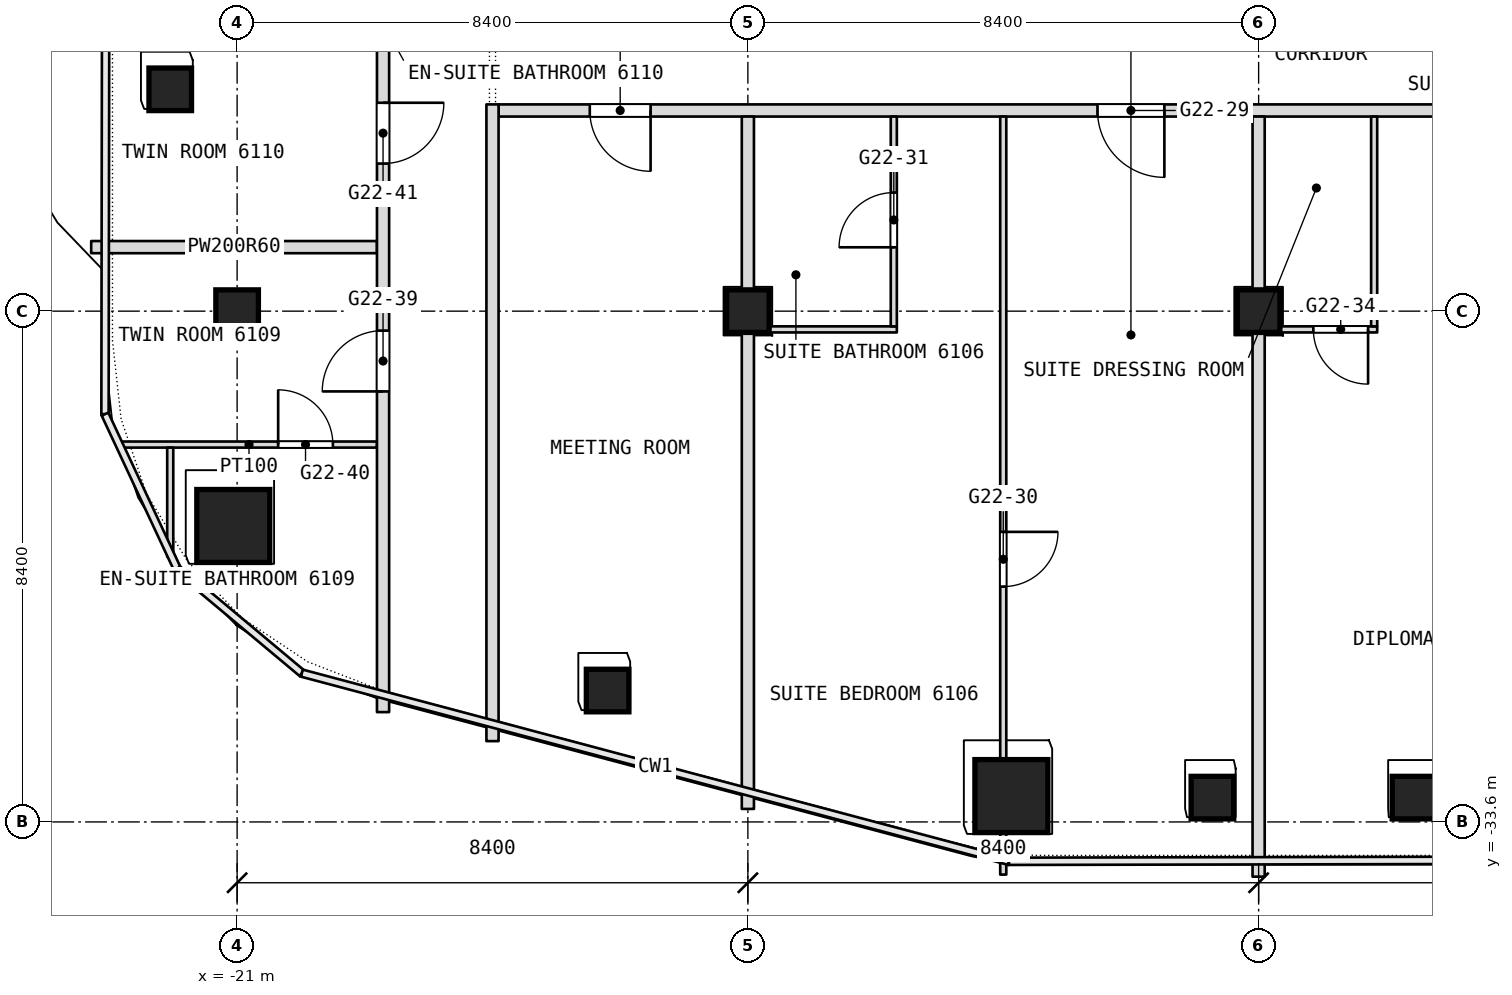
"""IFC4 building model, lengths in metres.
Left out: names, types, materials, properties, quantities, classifications, styles, units other than length and angle.
Written with IfcOpenShell. Run it as: python <this file> out.ifc"""

import sys

from ifc_helpers import new_model, si_unit, direction, frame, frame_2d, origin, origin_2d, place, context, subcontext, project, spatial, rectangle, extrude, element, fill, save


model = new_model("IFC4")
c1 = context("Model", 3, precision=1e-05, world=origin(), true_north=direction((0.0, 1.0)))
c2 = subcontext(c1, "Body", "Model", "MODEL_VIEW")
j1 = project(units=[si_unit("LENGTHUNIT", "METRE"), si_unit("PLANEANGLEUNIT", "RADIAN")], contexts=[c1])
p1 = place(None, origin())
s1 = spatial("IfcSite", under=j1, at=p1, CompositionType="ELEMENT")
p2 = place(p1, origin())
s2 = spatial("IfcBuilding", under=s1, at=p2, CompositionType="ELEMENT")
p3 = place(p2, frame((0.0, 0.0, 266.9)))
s3 = spatial("IfcBuildingStorey", under=s2, at=p3, CompositionType="ELEMENT", Elevation=266.9)
for number, where, z_axis, x_axis in (
    (1, (-21.063, -28.733, 0.0), (0.0, 0.0, 1.0), (1.0, 0.0, 0.0)),
    (2, (-8.266, -33.175, 0.0), (0.0, 0.0, 1.0), (1.0, 0.0, 0.0)),
):
    element("IfcColumn", number, at=place(p3, frame(where, z_axis=z_axis, x_axis=x_axis)), inside=s3, PredefinedType="COLUMN", context=c2, shape_type="SweptSolid", body=[
        extrude(rectangle(XDim=1.2, YDim=1.2, at=origin_2d()), origin(), (0.0, 0.0, 1.0), 3.6),
    ])
p4 = place(p3, frame((-21.0, -25.2, -0.26), z_axis=(0.0, 0.0, 1.0), x_axis=(1.0, 0.0, 0.0)))
e3 = element("IfcColumn", 3, at=p4, inside=s3, PredefinedType="COLUMN", context=c2, shape_type="SweptSolid", body=[
    extrude(rectangle(XDim=0.7, YDim=0.7, at=origin_2d()), origin(), (0.0, 0.0, 1.0), 3.86),
])
for number, where, z_axis, x_axis in (
    (4, (-12.6, -25.2, 0.0), (0.0, 0.0, 1.0), (1.0, 0.0, 0.0)),
    (5, (-4.2, -25.2, 0.0), (0.0, 0.0, 1.0), (1.0, 0.0, 0.0)),
    (6, (-22.1, -21.552, 0.0), (0.0, 0.0, 1.0), (1.0, 0.0, 0.0)),
    (7, (-1.653, -33.2, 0.0), (0.0, 0.0, 1.0), (1.0, 0.0, 0.0)),
    (8, (-4.96, -33.2, 0.0), (0.0, 0.0, 1.0), (1.0, 0.0, 0.0)),
    (9, (-14.907, -31.439, 0.0), (0.0, 0.0, 1.0), (1.0, 0.0, 0.0)),
):
    element("IfcColumn", number, at=place(p3, frame(where, z_axis=z_axis, x_axis=x_axis)), inside=s3, PredefinedType="COLUMN", context=c2, shape_type="SweptSolid", body=[
        extrude(rectangle(XDim=0.7, YDim=0.7, at=origin_2d()), origin(), (0.0, 0.0, 1.0), 3.6),
    ])
p5 = place(p3, frame((-22.909, -27.394, 0.0), z_axis=(0.0, 0.0, 1.0), x_axis=(1.0, 0.0, 0.0)))
e10 = element("IfcWall", 10, at=p5, inside=s3, PredefinedType="PARTITIONING", context=c2, shape_type="SweptSolid", body=[
    extrude(rectangle(XDim=4.209, YDim=0.1, at=frame_2d((2.104, 0.0))), origin(), (0.0, 0.0, 1.0), 3.34),
])
p6 = place(p5, frame((2.584, 0.0, 0.0)))
e11 = element("IfcOpeningElement", 11, at=p6, cuts=e10, PredefinedType="OPENING", context=c2, shape_type="SweptSolid", body=[
    extrude(rectangle(XDim=0.9, YDim=2.1, at=frame_2d((0.45, 1.05))), frame((0.0, 0.05, 0.0), z_axis=(0.0, -1.0, 0.0), x_axis=(1.0, 0.0, 0.0)), (0.0, 0.0, 1.0), 0.1),
])
p7 = place(p3, frame((-12.5, -25.5, 0.0), z_axis=(0.0, 0.0, 1.0), x_axis=(1.0, 0.0, 0.0)))
e12 = element("IfcWall", 12, at=p7, inside=s3, PredefinedType="PARTITIONING", context=c2, shape_type="SweptSolid", body=[
    extrude(rectangle(XDim=2.35, YDim=0.1, at=frame_2d((1.175, 0.0))), origin(), (0.0, 0.0, 1.0), 3.34),
])
p8 = place(p3, frame((-4.1, -25.5, 0.0), z_axis=(0.0, 0.0, 1.0), x_axis=(1.0, 0.0, 0.0)))
e13 = element("IfcWall", 13, at=p8, inside=s3, PredefinedType="PARTITIONING", context=c2, shape_type="SweptSolid", body=[
    extrude(rectangle(XDim=1.85, YDim=0.1, at=frame_2d((0.925, 0.0))), origin(), (0.0, 0.0, 1.0), 3.34),
])
p9 = place(p8, frame((0.8, 0.0, 0.0)))
e14 = element("IfcOpeningElement", 14, at=p9, cuts=e13, PredefinedType="OPENING", context=c2, shape_type="SweptSolid", body=[
    extrude(rectangle(XDim=0.9, YDim=2.1, at=frame_2d((0.45, 1.05))), frame((0.0, 0.05, 0.0), z_axis=(0.0, -1.0, 0.0), x_axis=(1.0, 0.0, 0.0)), (0.0, 0.0, 1.0), 0.1),
])
p10 = place(p3, frame((-23.4, -24.147, 0.0), z_axis=(0.0, 0.0, 1.0), x_axis=(1.0, 0.0, 0.0)))
e15 = element("IfcWall", 15, at=p10, inside=s3, PredefinedType="PARTITIONING", context=c2, shape_type="SweptSolid", body=[
    extrude(rectangle(XDim=4.7, YDim=0.2, at=frame_2d((2.35, 0.0))), origin(), (0.0, 0.0, 1.0), 3.34),
])
p11 = place(p3, frame((-16.7, -21.9, 0.0), z_axis=(0.0, 0.0, 1.0), x_axis=(1.0, 0.0, 0.0)))
e16 = element("IfcWall", 16, at=p11, inside=s3, PredefinedType="PARTITIONING", context=c2, shape_type="SweptSolid", body=[
    extrude(rectangle(XDim=21.0, YDim=0.2, at=frame_2d((10.5, 0.0))), origin(), (0.0, 0.0, 1.0), 3.34),
])
p12 = place(p11, frame((1.5, 0.0, 0.0)))
e17 = element("IfcOpeningElement", 17, at=p12, cuts=e16, PredefinedType="OPENING", context=c2, shape_type="SweptSolid", body=[
    extrude(rectangle(XDim=1.0, YDim=2.1, at=frame_2d((0.5, 1.05))), frame((0.0, 0.1, 0.0), z_axis=(0.0, -1.0, 0.0), x_axis=(1.0, 0.0, 0.0)), (0.0, 0.0, 1.0), 0.2),
])
p13 = place(p11, frame((9.85, 0.0, 0.0)))
e18 = element("IfcOpeningElement", 18, at=p13, cuts=e16, PredefinedType="OPENING", context=c2, shape_type="SweptSolid", body=[
    extrude(rectangle(XDim=1.1, YDim=2.1, at=frame_2d((0.55, 1.05))), frame((0.0, 0.1, 0.0), z_axis=(0.0, -1.0, 0.0), x_axis=(1.0, 0.0, 0.0)), (0.0, 0.0, 1.0), 0.2),
])
p14 = place(p11, frame((16.1, 0.0, 0.0)))
e19 = element("IfcOpeningElement", 19, at=p14, cuts=e16, PredefinedType="OPENING", context=c2, shape_type="SweptSolid", body=[
    extrude(rectangle(XDim=1.1, YDim=2.1, at=frame_2d((0.55, 1.05))), frame((0.0, 0.1, 0.0), z_axis=(0.0, -1.0, 0.0), x_axis=(1.0, 0.0, 0.0)), (0.0, 0.0, 1.0), 0.2),
])
p15 = place(p3, frame((-2.3, -25.45, 0.0), z_axis=(0.0, 0.0, 1.0), x_axis=(0.0, 1.0, 0.0)))
e20 = element("IfcWall", 20, at=p15, inside=s3, PredefinedType="PARTITIONING", context=c2, shape_type="SweptSolid", body=[
    extrude(rectangle(XDim=3.45, YDim=0.1, at=frame_2d((1.725, 0.0))), origin(), (0.0, 0.0, 1.0), 3.34),
])
p16 = place(p3, frame((-4.2, -34.5, 0.0), z_axis=(0.0, 0.0, 1.0), x_axis=(0.0, 1.0, 0.0)))
e21 = element("IfcWall", 21, at=p16, inside=s3, PredefinedType="PARTITIONING", context=c2, shape_type="SweptSolid", body=[
    extrude(rectangle(XDim=12.5, YDim=0.2, at=frame_2d((6.25, 0.0))), origin(), (0.0, 0.0, 1.0), 3.34),
])
p17 = place(p3, frame((-8.4, -34.466, 0.0), z_axis=(0.0, 0.0, 1.0), x_axis=(0.0, 1.0, 0.0)))
e22 = element("IfcWall", 22, at=p17, inside=s3, PredefinedType="PARTITIONING", context=c2, shape_type="SweptSolid", body=[
    extrude(rectangle(XDim=0.691, YDim=0.1, at=frame_2d((0.346, 0.0))), origin(), (0.0, 0.0, 1.0), 3.34),
])
p18 = place(p3, frame((-8.4, -32.575, 0.0), z_axis=(0.0, 0.0, 1.0), x_axis=(0.0, 1.0, 0.0)))
e23 = element("IfcWall", 23, at=p18, inside=s3, PredefinedType="PARTITIONING", context=c2, shape_type="SweptSolid", body=[
    extrude(rectangle(XDim=10.575, YDim=0.1, at=frame_2d((5.288, 0.0))), origin(), (0.0, 0.0, 1.0), 3.34),
])
p19 = place(p18, frame((2.845, 0.0, 0.0)))
e24 = element("IfcOpeningElement", 24, at=p19, cuts=e23, PredefinedType="OPENING", context=c2, shape_type="SweptSolid", body=[
    extrude(rectangle(XDim=0.9, YDim=2.1, at=frame_2d((0.45, 1.05))), frame((0.0, 0.05, 0.0), z_axis=(0.0, -1.0, 0.0), x_axis=(1.0, 0.0, 0.0)), (0.0, 0.0, 1.0), 0.1),
])
p20 = place(p3, frame((-10.2, -25.45, 0.0), z_axis=(0.0, 0.0, 1.0), x_axis=(0.0, 1.0, 0.0)))
e25 = element("IfcWall", 25, at=p20, inside=s3, PredefinedType="PARTITIONING", context=c2, shape_type="SweptSolid", body=[
    extrude(rectangle(XDim=3.45, YDim=0.1, at=frame_2d((1.725, 0.0))), origin(), (0.0, 0.0, 1.0), 3.34),
])
p21 = place(p20, frame((1.3, 0.0, 0.0)))
e26 = element("IfcOpeningElement", 26, at=p21, cuts=e25, PredefinedType="OPENING", context=c2, shape_type="SweptSolid", body=[
    extrude(rectangle(XDim=0.9, YDim=2.1, at=frame_2d((0.45, 1.05))), frame((0.0, 0.05, 0.0), z_axis=(0.0, -1.0, 0.0), x_axis=(1.0, 0.0, 0.0)), (0.0, 0.0, 1.0), 0.1),
])
p22 = place(p3, frame((-12.6, -33.386, 0.0), z_axis=(0.0, 0.0, 1.0), x_axis=(0.0, 1.0, 0.0)))
e27 = element("IfcWall", 27, at=p22, inside=s3, PredefinedType="PARTITIONING", context=c2, shape_type="SweptSolid", body=[
    extrude(rectangle(XDim=11.386, YDim=0.2, at=frame_2d((5.693, 0.0))), origin(), (0.0, 0.0, 1.0), 3.34),
])
p23 = place(p3, frame((-16.8, -32.271, 0.0), z_axis=(0.0, 0.0, 1.0), x_axis=(0.0, 1.0, 0.0)))
e28 = element("IfcWall", 28, at=p23, inside=s3, PredefinedType="PARTITIONING", context=c2, shape_type="SweptSolid", body=[
    extrude(rectangle(XDim=10.471, YDim=0.2, at=frame_2d((5.235, 0.0))), origin(), (0.0, 0.0, 1.0), 3.34),
])
p24 = place(p3, frame((-18.6, -31.794, 0.0), z_axis=(0.0, 0.0, 1.0), x_axis=(0.0, 1.0, 0.0)))
e29 = element("IfcWall", 29, at=p24, inside=s3, PredefinedType="PARTITIONING", context=c2, shape_type="SweptSolid", body=[
    extrude(rectangle(XDim=48.697, YDim=0.2, at=frame_2d((24.349, 0.0))), origin(), (0.0, 0.0, 1.0), 3.34),
])
p25 = place(p24, frame((5.274, 0.0, 0.0)))
e30 = element("IfcOpeningElement", 30, at=p25, cuts=e29, PredefinedType="OPENING", context=c2, shape_type="SweptSolid", body=[
    extrude(rectangle(XDim=1.0, YDim=2.1, at=frame_2d((0.5, 1.05))), frame((0.0, 0.1, 0.0), z_axis=(0.0, -1.0, 0.0), x_axis=(1.0, 0.0, 0.0)), (0.0, 0.0, 1.0), 0.2),
])
p26 = place(p24, frame((9.021, 0.0, 0.0)))
e31 = element("IfcOpeningElement", 31, at=p26, cuts=e29, PredefinedType="OPENING", context=c2, shape_type="SweptSolid", body=[
    extrude(rectangle(XDim=1.0, YDim=2.1, at=frame_2d((0.5, 1.05))), frame((0.0, 0.1, 0.0), z_axis=(0.0, -1.0, 0.0), x_axis=(1.0, 0.0, 0.0)), (0.0, 0.0, 1.0), 0.2),
])
p27 = place(p24, frame((18.294, 0.0, 0.0)))
e32 = element("IfcOpeningElement", 32, at=p27, cuts=e29, PredefinedType="OPENING", context=c2, shape_type="SweptSolid", body=[
    extrude(rectangle(XDim=1.8, YDim=2.1, at=frame_2d((0.9, 1.05))), frame((0.0, 0.1, 0.0), z_axis=(0.0, -1.0, 0.0), x_axis=(1.0, 0.0, 0.0)), (0.0, 0.0, 1.0), 0.2),
])
p28 = place(p24, frame((27.094, 0.0, 0.0)))
e33 = element("IfcOpeningElement", 33, at=p28, cuts=e29, PredefinedType="OPENING", context=c2, shape_type="SweptSolid", body=[
    extrude(rectangle(XDim=1.1, YDim=2.1, at=frame_2d((0.55, 1.05))), frame((0.0, 0.1, 0.0), z_axis=(0.0, -1.0, 0.0), x_axis=(1.0, 0.0, 0.0)), (0.0, 0.0, 1.0), 0.2),
])
p29 = place(p24, frame((35.394, 0.0, 0.0)))
e34 = element("IfcOpeningElement", 34, at=p29, cuts=e29, PredefinedType="OPENING", context=c2, shape_type="SweptSolid", body=[
    extrude(rectangle(XDim=1.1, YDim=2.1, at=frame_2d((0.55, 1.05))), frame((0.0, 0.1, 0.0), z_axis=(0.0, -1.0, 0.0), x_axis=(1.0, 0.0, 0.0)), (0.0, 0.0, 1.0), 0.2),
])
p30 = place(p24, frame((43.894, 0.0, 0.0)))
e35 = element("IfcOpeningElement", 35, at=p30, cuts=e29, PredefinedType="OPENING", context=c2, shape_type="SweptSolid", body=[
    extrude(rectangle(XDim=1.1, YDim=2.1, at=frame_2d((0.55, 1.05))), frame((0.0, 0.1, 0.0), z_axis=(0.0, -1.0, 0.0), x_axis=(1.0, 0.0, 0.0)), (0.0, 0.0, 1.0), 0.2),
])
p31 = place(p3, frame((-22.1, -29.241, 0.0), z_axis=(0.0, 0.0, 1.0), x_axis=(0.0, 1.0, 0.0)))
e36 = element("IfcWall", 36, at=p31, inside=s3, PredefinedType="PARTITIONING", context=c2, shape_type="SweptSolid", body=[
    extrude(rectangle(XDim=1.797, YDim=0.1, at=frame_2d((0.898, 0.0))), origin(), (0.0, 0.0, 1.0), 3.34),
])
p32 = place(p6, origin())
e37 = element("IfcDoor", 37, at=p32, inside=s3, OperationType="SINGLE_SWING_RIGHT", PredefinedType="DOOR", context=c2, shape_type="SweptSolid", body=[
    extrude(rectangle(XDim=0.9, YDim=2.1, at=frame_2d((0.45, 1.05))), frame((0.0, 0.025, 0.0), z_axis=(0.0, -1.0, 0.0), x_axis=(1.0, 0.0, 0.0)), (0.0, 0.0, 1.0), 0.05),
])
fill(e11, e37)
p33 = place(p9, origin())
e38 = element("IfcDoor", 38, at=p33, inside=s3, OperationType="SINGLE_SWING_RIGHT", PredefinedType="DOOR", context=c2, shape_type="SweptSolid", body=[
    extrude(rectangle(XDim=0.9, YDim=2.1, at=frame_2d((0.45, 1.05))), frame((0.0, 0.025, 0.0), z_axis=(0.0, -1.0, 0.0), x_axis=(1.0, 0.0, 0.0)), (0.0, 0.0, 1.0), 0.05),
])
fill(e14, e38)
p34 = place(p12, origin())
e39 = element("IfcDoor", 39, at=p34, inside=s3, OperationType="SINGLE_SWING_LEFT", PredefinedType="DOOR", context=c2, shape_type="SweptSolid", body=[
    extrude(rectangle(XDim=1.0, YDim=2.1, at=frame_2d((0.5, 1.05))), frame((0.0, 0.025, 0.0), z_axis=(0.0, -1.0, 0.0), x_axis=(1.0, 0.0, 0.0)), (0.0, 0.0, 1.0), 0.05),
])
fill(e17, e39)
p35 = place(p13, origin())
e40 = element("IfcDoor", 40, at=p35, inside=s3, OperationType="SINGLE_SWING_LEFT", PredefinedType="DOOR", context=c2, shape_type="SweptSolid", body=[
    extrude(rectangle(XDim=1.1, YDim=2.1, at=frame_2d((0.55, 1.05))), frame((0.0, 0.025, 0.0), z_axis=(0.0, -1.0, 0.0), x_axis=(1.0, 0.0, 0.0)), (0.0, 0.0, 1.0), 0.05),
])
fill(e18, e40)
p36 = place(p19, origin())
e41 = element("IfcDoor", 41, at=p36, inside=s3, OperationType="SINGLE_SWING_LEFT", PredefinedType="DOOR", context=c2, shape_type="SweptSolid", body=[
    extrude(rectangle(XDim=0.9, YDim=2.1, at=frame_2d((0.45, 1.05))), frame((0.0, 0.025, 0.0), z_axis=(0.0, -1.0, 0.0), x_axis=(1.0, 0.0, 0.0)), (0.0, 0.0, 1.0), 0.05),
])
fill(e24, e41)
p37 = place(p21, origin())
e42 = element("IfcDoor", 42, at=p37, inside=s3, OperationType="SINGLE_SWING_RIGHT", PredefinedType="DOOR", context=c2, shape_type="SweptSolid", body=[
    extrude(rectangle(XDim=0.9, YDim=2.1, at=frame_2d((0.45, 1.05))), frame((0.0, 0.025, 0.0), z_axis=(0.0, -1.0, 0.0), x_axis=(1.0, 0.0, 0.0)), (0.0, 0.0, 1.0), 0.05),
])
fill(e26, e42)
p38 = place(p25, origin())
e43 = element("IfcDoor", 43, at=p38, inside=s3, OperationType="SINGLE_SWING_LEFT", PredefinedType="DOOR", context=c2, shape_type="SweptSolid", body=[
    extrude(rectangle(XDim=1.0, YDim=2.1, at=frame_2d((0.5, 1.05))), frame((0.0, 0.025, 0.0), z_axis=(0.0, -1.0, 0.0), x_axis=(1.0, 0.0, 0.0)), (0.0, 0.0, 1.0), 0.05),
])
fill(e30, e43)
p39 = place(p26, origin())
e44 = element("IfcDoor", 44, at=p39, inside=s3, OperationType="SINGLE_SWING_RIGHT", PredefinedType="DOOR", context=c2, shape_type="SweptSolid", body=[
    extrude(rectangle(XDim=1.0, YDim=2.1, at=frame_2d((0.5, 1.05))), frame((0.0, 0.025, 0.0), z_axis=(0.0, -1.0, 0.0), x_axis=(1.0, 0.0, 0.0)), (0.0, 0.0, 1.0), 0.05),
])
fill(e31, e44)
save(model, sys.argv[1])
